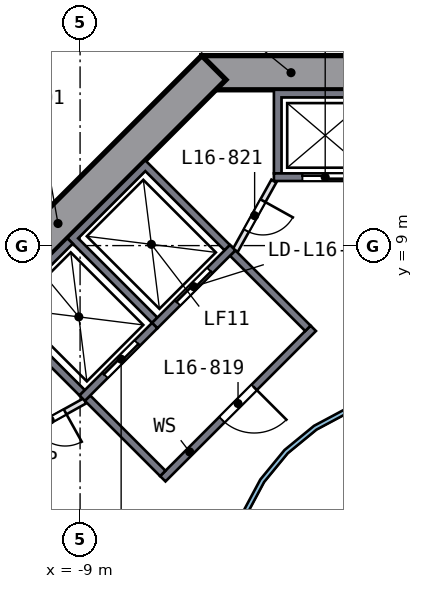
"""IFC4 building model, lengths in metres.
Left out: names, types, materials, properties, quantities, classifications, styles, units other than length and angle.
Written with IfcOpenShell. Run it as: python <this file> out.ifc"""

import sys

from ifc_helpers import new_model, si_unit, direction, frame, frame_2d, origin, place, context, subcontext, project, spatial, polyline, rectangle, outline, extrude, element, fill, save


model = new_model("IFC4")
c1 = context("Model", 3, precision=1e-05, world=origin(), true_north=direction((0.0, 1.0)))
c2 = subcontext(c1, "Body", "Model", "MODEL_VIEW")
j1 = project(units=[si_unit("LENGTHUNIT", "METRE"), si_unit("PLANEANGLEUNIT", "RADIAN")], contexts=[c1])
p1 = place(None, origin())
s1 = spatial("IfcSite", under=j1, at=p1, CompositionType="ELEMENT")
p2 = place(p1, origin())
s2 = spatial("IfcBuilding", under=s1, at=p2, CompositionType="ELEMENT")
p3 = place(p2, frame((0.0, 0.0, 71.5)))
s3 = spatial("IfcBuildingStorey", under=s2, at=p3, CompositionType="ELEMENT", Elevation=71.5)
p4 = place(p3, frame((5.799, 13.55, 0.0), z_axis=(0.0, 0.0, 1.0), x_axis=(-1.0, 0.0, 0.0)))
e1 = element("IfcWall", 1, at=p4, inside=s3, PredefinedType="SHEAR", context=c2, shape_type="SweptSolid", body=[
    extrude(rectangle(XDim=11.598, YDim=0.9, at=frame_2d((5.799, 0.0))), origin(), (0.0, 0.0, 1.0), 3.5),
])
p5 = place(p4, frame((4.899, 0.0, 0.0)))
e2 = element("IfcOpeningElement", 2, at=p5, cuts=e1, PredefinedType="OPENING", context=c2, shape_type="SweptSolid", body=[
    extrude(rectangle(XDim=1.8, YDim=2.1, at=frame_2d((0.9, 1.05))), frame((0.0, 0.46, 0.0), z_axis=(0.0, -1.0, 0.0), x_axis=(1.0, 0.0, 0.0)), (0.0, 0.0, 1.0), 0.92),
])
p6 = place(p3, frame((-5.481, 13.682, 0.0), z_axis=(0.0, 0.0, 1.0), x_axis=(-0.707106781, -0.707106781, 0.0)))
e3 = element("IfcWall", 3, at=p6, inside=s3, PredefinedType="SHEAR", context=c2, shape_type="SweptSolid", body=[
    extrude(rectangle(XDim=11.598, YDim=0.9, at=frame_2d((5.799, 0.0))), origin(), (0.0, 0.0, 1.0), 3.5),
])
p7 = place(p3, frame((-16.392, 9.617, 0.0), z_axis=(0.0, 0.0, 1.0), x_axis=(0.770516134, 0.637420495, 0.0)))
e4 = element("IfcWall", 4, at=p7, inside=s3, PredefinedType="SOLIDWALL", context=c2, shape_type="SweptSolid", body=[
    extrude(rectangle(XDim=13.0, YDim=0.2, at=frame_2d((6.5, 0.0))), origin(), (0.0, 0.0, 1.0), 3.0),
])
p8 = place(p7, frame((5.6, 0.0, 0.0)))
e5 = element("IfcOpeningElement", 5, at=p8, cuts=e4, PredefinedType="OPENING", context=c2, shape_type="SweptSolid", body=[
    extrude(rectangle(XDim=1.8, YDim=2.4, at=frame_2d((0.9, 1.2))), frame((0.0, 0.11, 0.0), z_axis=(0.0, -1.0, 0.0), x_axis=(1.0, 0.0, 0.0)), (0.0, 0.0, 1.0), 0.22),
])
p9 = place(p3, origin())
e6 = element("IfcWall", 6, at=p9, inside=s3, PredefinedType="SOLIDWALL", context=c2, shape_type="SweptSolid", body=[
    extrude(outline(polyline([(-3.9, 10.9), (-3.9, 13.1), (-1.2, 13.1), (-1.2, 10.9), (-1.4, 10.9), (-1.4, 12.9), (-3.7, 12.9), (-3.7, 10.9), (-3.9, 10.9)])), origin(), (0.0, 0.0, 1.0), 3.0),
])
p10 = place(p3, frame((-1.2, 10.8, 0.0), z_axis=(0.0, 0.0, 1.0), x_axis=(-1.0, 0.0, 0.0)))
e7 = element("IfcWall", 7, at=p10, inside=s3, PredefinedType="SOLIDWALL", context=c2, shape_type="SweptSolid", body=[
    extrude(rectangle(XDim=2.7, YDim=0.2, at=frame_2d((1.35, 0.0))), origin(), (0.0, 0.0, 1.0), 3.0),
])
p11 = place(p10, frame((0.75, 0.0, 0.0)))
e8 = element("IfcOpeningElement", 8, at=p11, cuts=e7, PredefinedType="OPENING", context=c2, shape_type="SweptSolid", body=[
    extrude(rectangle(XDim=1.2, YDim=2.1, at=frame_2d((0.6, 1.05))), frame((0.0, 0.11, 0.0), z_axis=(0.0, -1.0, 0.0), x_axis=(1.0, 0.0, 0.0)), (0.0, 0.0, 1.0), 0.22),
])
p12 = place(p3, origin())
e9 = element("IfcWall", 9, at=p12, inside=s3, PredefinedType="SOLIDWALL", context=c2, shape_type="SweptSolid", body=[
    extrude(outline(polyline([(-9.334, 9.192), (-7.283, 11.243), (-5.056, 9.016), (-5.197, 8.874), (-7.283, 10.96), (-9.051, 9.192), (-6.965, 7.106), (-7.106, 6.965), (-9.334, 9.192)])), origin(), (0.0, 0.0, 1.0), 3.0),
])
p13 = place(p3, frame((-4.985, 8.945, 0.0), z_axis=(0.0, 0.0, 1.0), x_axis=(-0.707106781, -0.707106781, 0.0)))
e10 = element("IfcWall", 10, at=p13, inside=s3, PredefinedType="SOLIDWALL", context=c2, shape_type="SweptSolid", body=[
    extrude(rectangle(XDim=2.9, YDim=0.2, at=frame_2d((1.45, 0.0))), origin(), (0.0, 0.0, 1.0), 3.0),
])
p14 = place(p13, frame((0.85, 0.0, 0.0)))
e11 = element("IfcOpeningElement", 11, at=p14, cuts=e10, PredefinedType="OPENING", context=c2, shape_type="SweptSolid", body=[
    extrude(rectangle(XDim=1.2, YDim=2.1, at=frame_2d((0.6, 1.05))), frame((0.0, 0.11, 0.0), z_axis=(0.0, -1.0, 0.0), x_axis=(1.0, 0.0, 0.0)), (0.0, 0.0, 1.0), 0.22),
])
p15 = place(p3, origin())
e12 = element("IfcWall", 12, at=p15, inside=s3, PredefinedType="SOLIDWALL", context=c2, shape_type="SweptSolid", body=[
    extrude(outline(polyline([(-11.243, 7.283), (-9.334, 9.192), (-9.192, 9.051), (-10.96, 7.283), (-8.874, 5.197), (-9.016, 5.056), (-11.243, 7.283)])), origin(), (0.0, 0.0, 1.0), 3.0),
])
p16 = place(p3, frame((-7.036, 6.894, 0.0), z_axis=(0.0, 0.0, 1.0), x_axis=(-0.707106781, -0.707106781, 0.0)))
e13 = element("IfcWall", 13, at=p16, inside=s3, PredefinedType="SOLIDWALL", context=c2, shape_type="SweptSolid", body=[
    extrude(rectangle(XDim=2.7, YDim=0.2, at=frame_2d((1.35, 0.0))), origin(), (0.0, 0.0, 1.0), 3.0),
])
p17 = place(p16, frame((0.65, 0.0, 0.0)))
e14 = element("IfcOpeningElement", 14, at=p17, cuts=e13, PredefinedType="OPENING", context=c2, shape_type="SweptSolid", body=[
    extrude(rectangle(XDim=1.2, YDim=2.1, at=frame_2d((0.6, 1.05))), frame((0.0, 0.11, 0.0), z_axis=(0.0, -1.0, 0.0), x_axis=(1.0, 0.0, 0.0)), (0.0, 0.0, 1.0), 0.22),
])
p18 = place(p3, frame((-2.864, 6.823, 0.0), z_axis=(0.0, 0.0, 1.0), x_axis=(-0.707106781, -0.707106781, 0.0)))
e15 = element("IfcWall", 15, at=p18, inside=s3, PredefinedType="SOLIDWALL", context=c2, shape_type="SweptSolid", body=[
    extrude(rectangle(XDim=5.6, YDim=0.2, at=frame_2d((2.8, 0.0))), origin(), (0.0, 0.0, 1.0), 3.0),
])
p19 = place(p18, frame((2.2, 0.0, 0.0)))
e16 = element("IfcOpeningElement", 16, at=p19, cuts=e15, PredefinedType="OPENING", context=c2, shape_type="SweptSolid", body=[
    extrude(rectangle(XDim=1.2, YDim=2.1, at=frame_2d((0.6, 1.05))), frame((0.0, 0.11, 0.0), z_axis=(0.0, -1.0, 0.0), x_axis=(1.0, 0.0, 0.0)), (0.0, 0.0, 1.0), 0.22),
])
for number, where, z_axis, x_axis in (
    (17, (-3.005, 6.823, 0.0), (0.0, 0.0, 1.0), (-0.707, 0.707, 0.0)),
    (18, (-6.823, 3.005, 0.0), (0.0, 0.0, 1.0), (-0.707, 0.707, 0.0)),
):
    element("IfcWall", number, at=place(p3, frame(where, z_axis=z_axis, x_axis=x_axis)), inside=s3, PredefinedType="SOLIDWALL", context=c2, shape_type="SweptSolid", body=[
        extrude(rectangle(XDim=2.8, YDim=0.2, at=frame_2d((1.4, 0.0))), origin(), (0.0, 0.0, 1.0), 3.0),
    ])
p20 = place(p3, frame((-3.9, 10.7, 0.0), z_axis=(0.0, 0.0, 1.0), x_axis=(-0.485692555, -0.874129705, 0.0)))
e19 = element("IfcWall", 19, at=p20, inside=s3, PredefinedType="PARTITIONING", context=c2, shape_type="SweptSolid", body=[
    extrude(rectangle(XDim=2.089, YDim=0.15, at=frame_2d((1.044, 0.0))), origin(), (0.0, 0.0, 1.0), 3.0),
])
p21 = place(p20, frame((0.594, 0.0, 0.0)))
e20 = element("IfcOpeningElement", 20, at=p21, cuts=e19, PredefinedType="OPENING", context=c2, shape_type="SweptSolid", body=[
    extrude(rectangle(XDim=0.9, YDim=2.1, at=frame_2d((0.45, 1.05))), frame((0.0, 0.085, 0.0), z_axis=(0.0, -1.0, 0.0), x_axis=(1.0, 0.0, 0.0)), (0.0, 0.0, 1.0), 0.17),
])
p22 = place(p3, frame((-8.874, 4.914, 0.0), z_axis=(0.0, 0.0, 1.0), x_axis=(-0.874129705, -0.485692555, 0.0)))
e21 = element("IfcWall", 21, at=p22, inside=s3, PredefinedType="PARTITIONING", context=c2, shape_type="SweptSolid", body=[
    extrude(rectangle(XDim=2.089, YDim=0.15, at=frame_2d((1.044, 0.0))), origin(), (0.0, 0.0, 1.0), 3.0),
])
p23 = place(p22, frame((0.594, 0.0, 0.0)))
e22 = element("IfcOpeningElement", 22, at=p23, cuts=e21, PredefinedType="OPENING", context=c2, shape_type="SweptSolid", body=[
    extrude(rectangle(XDim=0.9, YDim=2.1, at=frame_2d((0.45, 1.05))), frame((0.0, 0.085, 0.0), z_axis=(0.0, -1.0, 0.0), x_axis=(1.0, 0.0, 0.0)), (0.0, 0.0, 1.0), 0.17),
])
p24 = place(p3, origin())
e23 = element("IfcWall", 23, at=p24, inside=s3, PredefinedType="SOLIDWALL", context=c2, shape_type="SweptSolid", body=[
    extrude(outline(polyline([(5.021, -0.999), (4.73, -1.959), (4.257, -2.844), (3.62, -3.62), (2.844, -4.257), (1.959, -4.73), (0.999, -5.021), (0.0, -5.12), (-0.999, -5.021), (-1.959, -4.73), (-2.844, -4.257), (-3.62, -3.62), (-4.257, -2.844), (-4.73, -1.959), (-5.021, -0.999), (-5.12, 0.0), (-5.021, 0.999), (-4.73, 1.959), (-4.257, 2.844), (-3.62, 3.62), (-2.844, 4.257), (-1.959, 4.73), (-0.999, 5.021), (0.0, 5.12), (0.999, 5.021), (1.959, 4.73), (2.844, 4.257), (3.62, 3.62), (4.257, 2.844), (4.73, 1.959), (5.021, 0.999), (5.12, 0.0), (5.021, -0.999)]), holes=[polyline([(4.904, 0.976), (4.619, 1.913), (4.157, 2.778), (3.535, 3.535), (2.778, 4.157), (1.913, 4.619), (0.976, 4.904), (0.0, 5.0), (-0.976, 4.904), (-1.913, 4.619), (-2.778, 4.157), (-3.535, 3.535), (-4.157, 2.778), (-4.619, 1.913), (-4.904, 0.976), (-5.0, 0.0), (-4.904, -0.976), (-4.619, -1.913), (-4.157, -2.778), (-3.535, -3.535), (-2.778, -4.157), (-1.913, -4.619), (-0.976, -4.904), (0.0, -5.0), (0.976, -4.904), (1.913, -4.619), (2.778, -4.157), (3.535, -3.535), (4.157, -2.778), (4.619, -1.913), (4.904, -0.976), (5.0, 0.0), (4.904, 0.976)])]), origin(), (0.0, 0.0, 1.0), 3.0),
])
p25 = place(p11, origin())
e24 = element("IfcDoor", 24, at=p25, inside=s3, OperationType="DOUBLE_DOOR_SLIDING", PredefinedType="DOOR", context=c2, shape_type="SweptSolid", body=[
    extrude(rectangle(XDim=1.2, YDim=2.1, at=frame_2d((0.6, 1.05))), frame((0.0, 0.025, 0.0), z_axis=(0.0, -1.0, 0.0), x_axis=(1.0, 0.0, 0.0)), (0.0, 0.0, 1.0), 0.05),
])
fill(e8, e24)
p26 = place(p14, origin())
e25 = element("IfcDoor", 25, at=p26, inside=s3, OperationType="DOUBLE_DOOR_SLIDING", PredefinedType="DOOR", context=c2, shape_type="SweptSolid", body=[
    extrude(rectangle(XDim=1.2, YDim=2.1, at=frame_2d((0.6, 1.05))), frame((0.0, 0.025, 0.0), z_axis=(0.0, -1.0, 0.0), x_axis=(1.0, 0.0, 0.0)), (0.0, 0.0, 1.0), 0.05),
])
fill(e11, e25)
p27 = place(p17, origin())
e26 = element("IfcDoor", 26, at=p27, inside=s3, OperationType="DOUBLE_DOOR_SLIDING", PredefinedType="DOOR", context=c2, shape_type="SweptSolid", body=[
    extrude(rectangle(XDim=1.2, YDim=2.1, at=frame_2d((0.6, 1.05))), frame((0.0, 0.025, 0.0), z_axis=(0.0, -1.0, 0.0), x_axis=(1.0, 0.0, 0.0)), (0.0, 0.0, 1.0), 0.05),
])
fill(e14, e26)
p28 = place(p19, origin())
e27 = element("IfcDoor", 27, at=p28, inside=s3, OperationType="SINGLE_SWING_LEFT", PredefinedType="DOOR", context=c2, shape_type="SweptSolid", body=[
    extrude(rectangle(XDim=1.2, YDim=2.1, at=frame_2d((0.6, 1.05))), frame((0.0, 0.025, 0.0), z_axis=(0.0, -1.0, 0.0), x_axis=(1.0, 0.0, 0.0)), (0.0, 0.0, 1.0), 0.05),
])
fill(e16, e27)
p29 = place(p21, origin())
e28 = element("IfcDoor", 28, at=p29, inside=s3, OperationType="SINGLE_SWING_LEFT", PredefinedType="DOOR", context=c2, shape_type="SweptSolid", body=[
    extrude(rectangle(XDim=0.9, YDim=2.1, at=frame_2d((0.45, 1.05))), frame((0.0, 0.025, 0.0), z_axis=(0.0, -1.0, 0.0), x_axis=(1.0, 0.0, 0.0)), (0.0, 0.0, 1.0), 0.05),
])
fill(e20, e28)
p30 = place(p23, origin())
e29 = element("IfcDoor", 29, at=p30, inside=s3, OperationType="SINGLE_SWING_LEFT", PredefinedType="DOOR", context=c2, shape_type="SweptSolid", body=[
    extrude(rectangle(XDim=0.9, YDim=2.1, at=frame_2d((0.45, 1.05))), frame((0.0, 0.025, 0.0), z_axis=(0.0, -1.0, 0.0), x_axis=(1.0, 0.0, 0.0)), (0.0, 0.0, 1.0), 0.05),
])
fill(e22, e29)
save(model, sys.argv[1])
